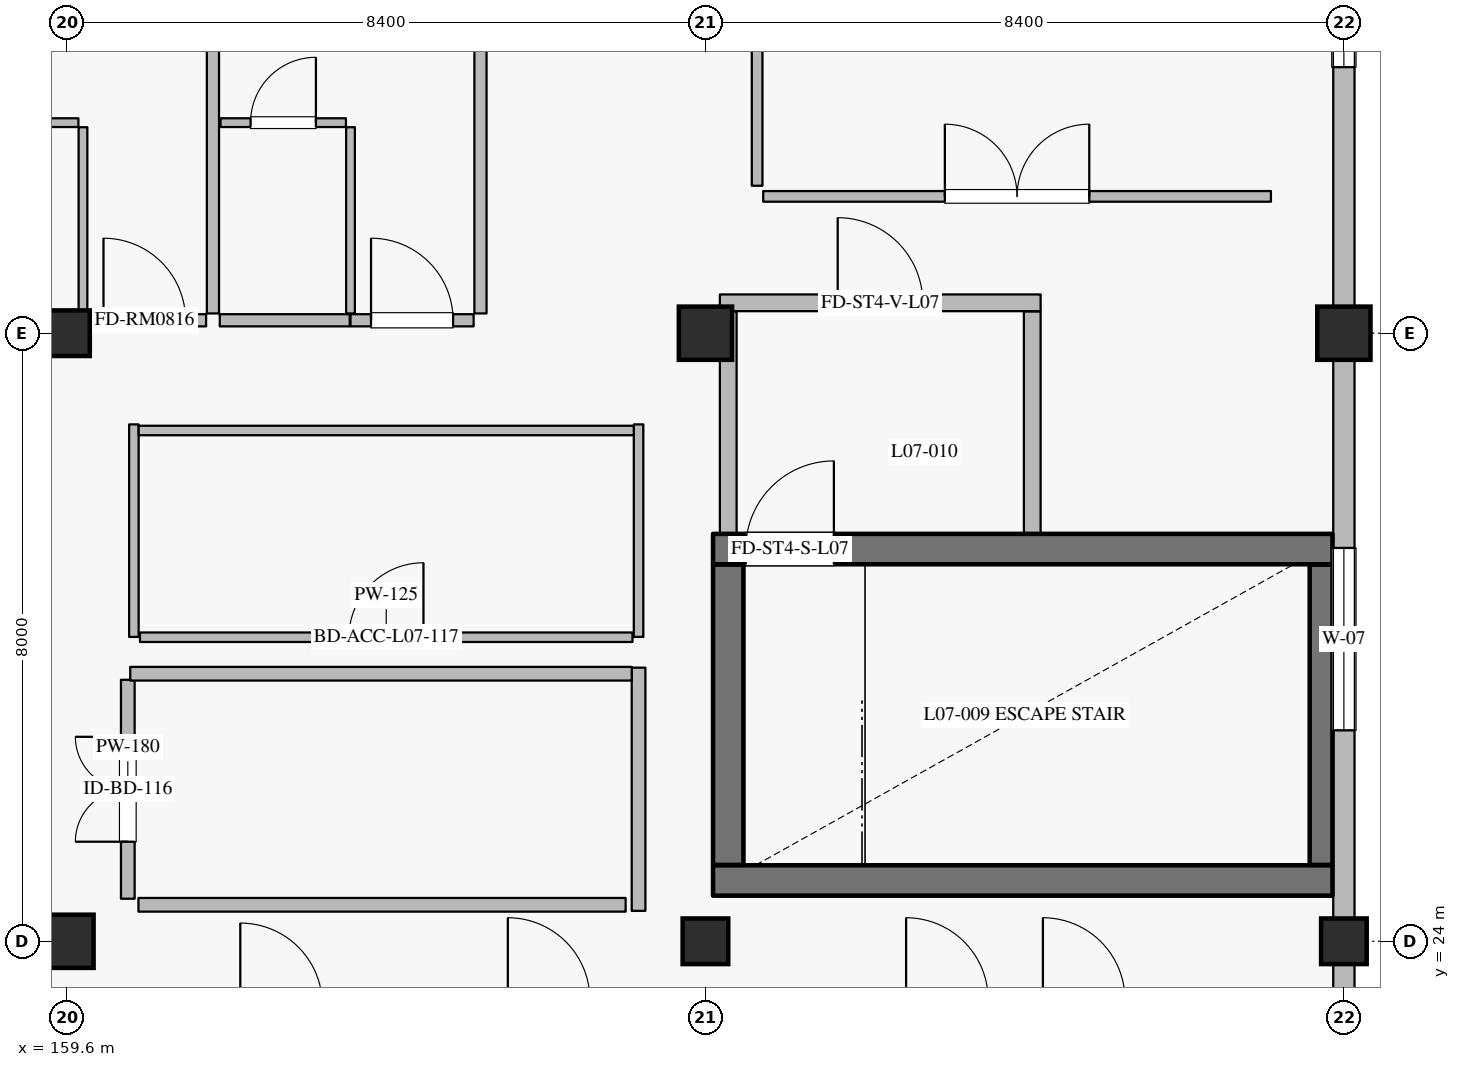
"""IFC4 building model, lengths in metres.
Left out: names, types, materials, properties, quantities, classifications, styles, units other than length and angle.
Written with IfcOpenShell. Run it as: python <this file> out.ifc"""

import sys

from ifc_helpers import new_model, si_unit, direction, frame, frame_2d, origin, origin_2d, place, context, subcontext, project, spatial, rectangle, extrude, element, fill, save


model = new_model("IFC4")
c1 = context("Model", 3, precision=1e-05, world=origin(), true_north=direction((0.0, 1.0)))
c2 = subcontext(c1, "Body", "Model", "MODEL_VIEW")
j1 = project(units=[si_unit("LENGTHUNIT", "METRE"), si_unit("PLANEANGLEUNIT", "RADIAN")], contexts=[c1])
p1 = place(None, origin())
s1 = spatial("IfcSite", under=j1, at=p1, CompositionType="ELEMENT")
p2 = place(p1, origin())
s2 = spatial("IfcBuilding", under=s1, at=p2, CompositionType="ELEMENT")
p3 = place(p2, frame((0.0, 0.0, 32.4)))
s3 = spatial("IfcBuildingStorey", under=s2, at=p3, CompositionType="ELEMENT", Elevation=32.4)
for number, where, z_axis, x_axis in (
    (1, (159.6, 24.0, 0.0), (0.0, 0.0, 1.0), (1.0, 0.0, 0.0)),
    (2, (168.0, 32.0, 0.0), (0.0, 0.0, 1.0), (1.0, 0.0, 0.0)),
    (3, (176.4, 32.0, 0.0), (0.0, 0.0, 1.0), (1.0, 0.0, 0.0)),
):
    element("IfcColumn", number, at=place(p3, frame(where, z_axis=z_axis, x_axis=x_axis)), inside=s3, PredefinedType="COLUMN", context=c2, shape_type="SweptSolid", body=[
        extrude(rectangle(XDim=0.7, YDim=0.7, at=origin_2d()), origin(), (0.0, 0.0, 1.0), 3.6),
    ])
for number, where, z_axis, x_axis in (
    (4, (159.6, 32.0, 0.0), (0.0, 0.0, 1.0), (1.0, 0.0, 0.0)),
    (5, (168.0, 24.0, 0.0), (0.0, 0.0, 1.0), (1.0, 0.0, 0.0)),
    (6, (176.4, 24.0, 0.0), (0.0, 0.0, 1.0), (1.0, 0.0, 0.0)),
):
    element("IfcColumn", number, at=place(p3, frame(where, z_axis=z_axis, x_axis=x_axis)), inside=s3, PredefinedType="COLUMN", context=c2, shape_type="SweptSolid", body=[
        extrude(rectangle(XDim=0.6, YDim=0.6, at=origin_2d()), origin(), (0.0, 0.0, 1.0), 3.6),
    ])
p4 = place(p3, frame((176.4, 39.7, 0.0), z_axis=(0.0, 0.0, 1.0), x_axis=(0.0, -1.0, 0.0)))
e7 = element("IfcWall", 7, at=p4, inside=s3, PredefinedType="SOLIDWALL", context=c2, shape_type="SweptSolid", body=[
    extrude(rectangle(XDim=7.35, YDim=0.28, at=frame_2d((3.675, 0.0))), origin(), (0.0, 0.0, 1.0), 2.7),
])
p5 = place(p4, frame((3.15, 0.0, 0.5)))
e8 = element("IfcOpeningElement", 8, at=p5, cuts=e7, PredefinedType="OPENING", context=c2, shape_type="SweptSolid", body=[
    extrude(rectangle(XDim=1.05, YDim=1.65, at=frame_2d((0.525, 0.825))), frame((0.0, 0.15, 0.0), z_axis=(0.0, -1.0, 0.0), x_axis=(1.0, 0.0, 0.0)), (0.0, 0.0, 1.0), 0.3),
])
p6 = place(p3, frame((176.4, 31.65, 0.0), z_axis=(0.0, 0.0, 1.0), x_axis=(0.0, -1.0, 0.0)))
e9 = element("IfcWall", 9, at=p6, inside=s3, PredefinedType="SOLIDWALL", context=c2, shape_type="SweptSolid", body=[
    extrude(rectangle(XDim=7.35, YDim=0.28, at=frame_2d((3.675, 0.0))), origin(), (0.0, 0.0, 1.0), 2.7),
])
p7 = place(p6, frame((2.475, 0.0, 0.5)))
e10 = element("IfcOpeningElement", 10, at=p7, cuts=e9, PredefinedType="OPENING", context=c2, shape_type="SweptSolid", body=[
    extrude(rectangle(XDim=2.4, YDim=1.65, at=frame_2d((1.2, 0.825))), frame((0.0, 0.15, 0.0), z_axis=(0.0, -1.0, 0.0), x_axis=(1.0, 0.0, 0.0)), (0.0, 0.0, 1.0), 0.3),
])
p8 = place(p3, frame((176.4, 23.7, 0.0), z_axis=(0.0, 0.0, 1.0), x_axis=(0.0, -1.0, 0.0)))
e11 = element("IfcWall", 11, at=p8, inside=s3, PredefinedType="SOLIDWALL", context=c2, shape_type="SweptSolid", body=[
    extrude(rectangle(XDim=7.35, YDim=0.28, at=frame_2d((3.675, 0.0))), origin(), (0.0, 0.0, 1.0), 2.7),
])
p9 = place(p8, frame((2.475, 0.0, 0.5)))
e12 = element("IfcOpeningElement", 12, at=p9, cuts=e11, PredefinedType="OPENING", context=c2, shape_type="SweptSolid", body=[
    extrude(rectangle(XDim=2.4, YDim=1.65, at=frame_2d((1.2, 0.825))), frame((0.0, 0.15, 0.0), z_axis=(0.0, -1.0, 0.0), x_axis=(1.0, 0.0, 0.0)), (0.0, 0.0, 1.0), 0.3),
])
p10 = place(p3, frame((168.1, 24.8, 0.0), z_axis=(0.0, 0.0, 1.0), x_axis=(1.0, 0.0, 0.0)))
e13 = element("IfcWall", 13, at=p10, inside=s3, PredefinedType="SHEAR", context=c2, shape_type="SweptSolid", body=[
    extrude(rectangle(XDim=8.15, YDim=0.4, at=frame_2d((4.075, 0.0))), origin(), (0.0, 0.0, 1.0), 3.335),
])
p11 = place(p3, frame((176.1, 25.005, 0.0), z_axis=(0.0, 0.0, 1.0), x_axis=(0.0, 1.0, 0.0)))
e14 = element("IfcWall", 14, at=p11, inside=s3, PredefinedType="SHEAR", context=c2, shape_type="SweptSolid", body=[
    extrude(rectangle(XDim=3.95, YDim=0.3, at=frame_2d((1.975, 0.0))), origin(), (0.0, 0.0, 1.0), 3.335),
])
p12 = place(p3, frame((168.1, 29.16, 0.0), z_axis=(0.0, 0.0, 1.0), x_axis=(1.0, 0.0, 0.0)))
e15 = element("IfcWall", 15, at=p12, inside=s3, PredefinedType="SHEAR", context=c2, shape_type="SweptSolid", body=[
    extrude(rectangle(XDim=8.15, YDim=0.4, at=frame_2d((4.075, 0.0))), origin(), (0.0, 0.0, 1.0), 3.335),
])
p13 = place(p12, frame((0.43, 0.0, 0.0)))
e16 = element("IfcOpeningElement", 16, at=p13, cuts=e15, PredefinedType="OPENING", context=c2, shape_type="SweptSolid", body=[
    extrude(rectangle(XDim=1.16, YDim=2.2, at=frame_2d((0.58, 1.1))), frame((0.0, 0.21, 0.0), z_axis=(0.0, -1.0, 0.0), x_axis=(1.0, 0.0, 0.0)), (0.0, 0.0, 1.0), 0.42),
])
p14 = place(p3, frame((168.3, 25.005, 0.0), z_axis=(0.0, 0.0, 1.0), x_axis=(0.0, 1.0, 0.0)))
e17 = element("IfcWall", 17, at=p14, inside=s3, PredefinedType="SHEAR", context=c2, shape_type="SweptSolid", body=[
    extrude(rectangle(XDim=3.95, YDim=0.4, at=frame_2d((1.975, 0.0))), origin(), (0.0, 0.0, 1.0), 3.335),
])
p15 = place(p3, frame((168.3, 29.365, 0.0), z_axis=(0.0, 0.0, 1.0), x_axis=(0.0, 1.0, 0.0)))
e18 = element("IfcWall", 18, at=p15, inside=s3, PredefinedType="PARTITIONING", context=c2, shape_type="SweptSolid", body=[
    extrude(rectangle(XDim=2.92, YDim=0.22, at=frame_2d((1.46, 0.0))), origin(), (0.0, 0.0, 1.0), 3.335),
])
p16 = place(p3, frame((168.19, 32.4, 0.0), z_axis=(0.0, 0.0, 1.0), x_axis=(1.0, 0.0, 0.0)))
e19 = element("IfcWall", 19, at=p16, inside=s3, PredefinedType="PARTITIONING", context=c2, shape_type="SweptSolid", body=[
    extrude(rectangle(XDim=4.22, YDim=0.22, at=frame_2d((2.11, 0.0))), origin(), (0.0, 0.0, 1.0), 3.335),
])
p17 = place(p16, frame((1.55, 0.0, 0.0)))
e20 = element("IfcOpeningElement", 20, at=p17, cuts=e19, PredefinedType="OPENING", context=c2, shape_type="SweptSolid", body=[
    extrude(rectangle(XDim=1.12, YDim=2.2, at=frame_2d((0.56, 1.1))), frame((0.0, 0.12, 0.0), z_axis=(0.0, -1.0, 0.0), x_axis=(1.0, 0.0, 0.0)), (0.0, 0.0, 1.0), 0.24),
])
p18 = place(p3, frame((172.3, 29.365, 0.0), z_axis=(0.0, 0.0, 1.0), x_axis=(0.0, 1.0, 0.0)))
e21 = element("IfcWall", 21, at=p18, inside=s3, PredefinedType="PARTITIONING", context=c2, shape_type="SweptSolid", body=[
    extrude(rectangle(XDim=2.92, YDim=0.22, at=frame_2d((1.46, 0.0))), origin(), (0.0, 0.0, 1.0), 3.335),
])
p19 = place(p3, frame((158.09, 32.17, 0.0), z_axis=(0.0, 0.0, 1.0), x_axis=(1.0, 0.0, 0.0)))
e22 = element("IfcWall", 22, at=p19, inside=s3, PredefinedType="PARTITIONING", context=c2, shape_type="SweptSolid", body=[
    extrude(rectangle(XDim=1.71, YDim=0.16, at=frame_2d((0.855, 0.0))), origin(), (0.0, 0.0, 1.0), 2.84),
])
p20 = place(p3, frame((159.81, 32.17, 0.0), z_axis=(0.0, 0.0, 1.0), x_axis=(1.0, 0.0, 0.0)))
e23 = element("IfcWall", 23, at=p20, inside=s3, PredefinedType="PARTITIONING", context=c2, shape_type="SweptSolid", body=[
    extrude(rectangle(XDim=1.62, YDim=0.16, at=frame_2d((0.81, 0.0))), origin(), (0.0, 0.0, 1.0), 3.335),
])
p21 = place(p20, frame((0.27, 0.0, 0.0)))
e24 = element("IfcOpeningElement", 24, at=p21, cuts=e23, PredefinedType="OPENING", context=c2, shape_type="SweptSolid", body=[
    extrude(rectangle(XDim=1.08, YDim=2.3, at=frame_2d((0.54, 1.15))), frame((0.0, 0.09, 0.0), z_axis=(0.0, -1.0, 0.0), x_axis=(1.0, 0.0, 0.0)), (0.0, 0.0, 1.0), 0.18),
])
p22 = place(p3, frame((159.81, 32.26, 0.0), z_axis=(0.0, 0.0, 1.0), x_axis=(0.0, 1.0, 0.0)))
e25 = element("IfcWall", 25, at=p22, inside=s3, PredefinedType="PARTITIONING", context=c2, shape_type="SweptSolid", body=[
    extrude(rectangle(XDim=2.45, YDim=0.115, at=frame_2d((1.225, 0.0))), origin(), (0.0, 0.0, 1.0), 2.74),
])
p23 = place(p3, frame((158.1, 34.77, 0.0), z_axis=(0.0, 0.0, 1.0), x_axis=(1.0, 0.0, 0.0)))
e26 = element("IfcWall", 26, at=p23, inside=s3, PredefinedType="PARTITIONING", context=c2, shape_type="SweptSolid", body=[
    extrude(rectangle(XDim=1.65, YDim=0.115, at=frame_2d((0.825, 0.0))), origin(), (0.0, 0.0, 1.0), 3.335),
])
p24 = place(p23, frame((0.395, 0.0, 0.0)))
e27 = element("IfcOpeningElement", 27, at=p24, cuts=e26, PredefinedType="OPENING", context=c2, shape_type="SweptSolid", body=[
    extrude(rectangle(XDim=0.86, YDim=2.12, at=frame_2d((0.43, 1.06))), frame((0.0, 0.067, 0.0), z_axis=(0.0, -1.0, 0.0), x_axis=(1.0, 0.0, 0.0)), (0.0, 0.0, 1.0), 0.135),
])
p25 = place(p3, frame((161.61, 32.17, 0.0), z_axis=(0.0, 0.0, 1.0), x_axis=(1.0, 0.0, 0.0)))
e28 = element("IfcWall", 28, at=p25, inside=s3, PredefinedType="PARTITIONING", context=c2, shape_type="SweptSolid", body=[
    extrude(rectangle(XDim=1.71, YDim=0.16, at=frame_2d((0.855, 0.0))), origin(), (0.0, 0.0, 1.0), 3.335),
])
p26 = place(p3, frame((163.33, 32.17, 0.0), z_axis=(0.0, 0.0, 1.0), x_axis=(1.0, 0.0, 0.0)))
e29 = element("IfcWall", 29, at=p26, inside=s3, PredefinedType="PARTITIONING", context=c2, shape_type="SweptSolid", body=[
    extrude(rectangle(XDim=1.62, YDim=0.16, at=frame_2d((0.81, 0.0))), origin(), (0.0, 0.0, 1.0), 3.335),
])
p27 = place(p26, frame((0.27, 0.0, 0.0)))
e30 = element("IfcOpeningElement", 30, at=p27, cuts=e29, PredefinedType="OPENING", context=c2, shape_type="SweptSolid", body=[
    extrude(rectangle(XDim=1.08, YDim=2.3, at=frame_2d((0.54, 1.15))), frame((0.0, 0.09, 0.0), z_axis=(0.0, -1.0, 0.0), x_axis=(1.0, 0.0, 0.0)), (0.0, 0.0, 1.0), 0.18),
])
p28 = place(p3, frame((163.33, 32.26, 0.0), z_axis=(0.0, 0.0, 1.0), x_axis=(0.0, 1.0, 0.0)))
e31 = element("IfcWall", 31, at=p28, inside=s3, PredefinedType="PARTITIONING", context=c2, shape_type="SweptSolid", body=[
    extrude(rectangle(XDim=2.45, YDim=0.115, at=frame_2d((1.225, 0.0))), origin(), (0.0, 0.0, 1.0), 3.335),
])
p29 = place(p3, frame((161.62, 34.77, 0.0), z_axis=(0.0, 0.0, 1.0), x_axis=(1.0, 0.0, 0.0)))
e32 = element("IfcWall", 32, at=p29, inside=s3, PredefinedType="PARTITIONING", context=c2, shape_type="SweptSolid", body=[
    extrude(rectangle(XDim=1.65, YDim=0.115, at=frame_2d((0.825, 0.0))), origin(), (0.0, 0.0, 1.0), 3.335),
])
p30 = place(p29, frame((0.395, 0.0, 0.0)))
e33 = element("IfcOpeningElement", 33, at=p30, cuts=e32, PredefinedType="OPENING", context=c2, shape_type="SweptSolid", body=[
    extrude(rectangle(XDim=0.86, YDim=2.12, at=frame_2d((0.43, 1.06))), frame((0.0, 0.067, 0.0), z_axis=(0.0, -1.0, 0.0), x_axis=(1.0, 0.0, 0.0)), (0.0, 0.0, 1.0), 0.135),
])
p31 = place(p3, frame((161.52, 32.26, 0.0), z_axis=(0.0, 0.0, 1.0), x_axis=(0.0, 1.0, 0.0)))
e34 = element("IfcWall", 34, at=p31, inside=s3, PredefinedType="PARTITIONING", context=c2, shape_type="SweptSolid", body=[
    extrude(rectangle(XDim=9.23, YDim=0.16, at=frame_2d((4.615, 0.0))), origin(), (0.0, 0.0, 1.0), 3.335),
])
p32 = place(p3, frame((165.04, 32.26, 0.0), z_axis=(0.0, 0.0, 1.0), x_axis=(0.0, 1.0, 0.0)))
e35 = element("IfcWall", 35, at=p32, inside=s3, PredefinedType="PARTITIONING", context=c2, shape_type="SweptSolid", body=[
    extrude(rectangle(XDim=8.64, YDim=0.16, at=frame_2d((4.32, 0.0))), origin(), (0.0, 0.0, 1.0), 3.335),
])
p33 = place(p3, frame((160.4, 24.56, 0.0), z_axis=(0.0, 0.0, 1.0), x_axis=(0.0, 1.0, 0.0)))
e36 = element("IfcWall", 36, at=p33, inside=s3, PredefinedType="PARTITIONING", context=c2, shape_type="SweptSolid", body=[
    extrude(rectangle(XDim=2.88, YDim=0.18, at=frame_2d((1.44, 0.0))), origin(), (0.0, 0.0, 1.0), 3.335),
])
p34 = place(p33, frame((0.75, 0.0, 0.0)))
e37 = element("IfcOpeningElement", 37, at=p34, cuts=e36, PredefinedType="OPENING", context=c2, shape_type="SweptSolid", body=[
    extrude(rectangle(XDim=1.38, YDim=2.3, at=frame_2d((0.69, 1.15))), frame((0.0, 0.1, 0.0), z_axis=(0.0, -1.0, 0.0), x_axis=(1.0, 0.0, 0.0)), (0.0, 0.0, 1.0), 0.2),
])
p35 = place(p3, frame((160.54, 24.48, 0.0), z_axis=(0.0, 0.0, 1.0), x_axis=(1.0, 0.0, 0.0)))
e38 = element("IfcWall", 38, at=p35, inside=s3, PredefinedType="PARTITIONING", context=c2, shape_type="SweptSolid", body=[
    extrude(rectangle(XDim=6.41, YDim=0.18, at=frame_2d((3.205, 0.0))), origin(), (0.0, 0.0, 1.0), 3.335),
])
p36 = place(p3, frame((160.56, 28.0, 0.0), z_axis=(0.0, 0.0, 1.0), x_axis=(1.0, 0.0, 0.0)))
e39 = element("IfcWall", 39, at=p36, inside=s3, PredefinedType="PARTITIONING", context=c2, shape_type="SweptSolid", body=[
    extrude(rectangle(XDim=6.48, YDim=0.125, at=frame_2d((3.24, 0.0))), origin(), (0.0, 0.0, 1.0), 3.335),
])
p37 = place(p36, frame((2.75, 0.0, 0.0)))
e40 = element("IfcOpeningElement", 40, at=p37, cuts=e39, PredefinedType="OPENING", context=c2, shape_type="SweptSolid", body=[
    extrude(rectangle(XDim=0.98, YDim=2.15, at=frame_2d((0.49, 1.075))), frame((0.0, 0.073, 0.0), z_axis=(0.0, -1.0, 0.0), x_axis=(1.0, 0.0, 0.0)), (0.0, 0.0, 1.0), 0.145),
])
p38 = place(p3, frame((168.76, 33.8, 0.0), z_axis=(0.0, 0.0, 1.0), x_axis=(1.0, 0.0, 0.0)))
e41 = element("IfcWall", 41, at=p38, inside=s3, PredefinedType="PARTITIONING", context=c2, shape_type="SweptSolid", body=[
    extrude(rectangle(XDim=6.68, YDim=0.14, at=frame_2d((3.34, 0.0))), origin(), (0.0, 0.0, 1.0), 3.335),
])
p39 = place(p38, frame((2.39, 0.0, 0.0)))
e42 = element("IfcOpeningElement", 42, at=p39, cuts=e41, PredefinedType="OPENING", context=c2, shape_type="SweptSolid", body=[
    extrude(rectangle(XDim=1.9, YDim=2.4, at=frame_2d((0.95, 1.2))), frame((0.0, 0.08, 0.0), z_axis=(0.0, -1.0, 0.0), x_axis=(1.0, 0.0, 0.0)), (0.0, 0.0, 1.0), 0.16),
])
p40 = place(p3, frame((168.68, 33.94, 0.0), z_axis=(0.0, 0.0, 1.0), x_axis=(0.0, 1.0, 0.0)))
e43 = element("IfcWall", 43, at=p40, inside=s3, PredefinedType="PARTITIONING", context=c2, shape_type="SweptSolid", body=[
    extrude(rectangle(XDim=4.61, YDim=0.14, at=frame_2d((2.305, 0.0))), origin(), (0.0, 0.0, 1.0), 3.335),
])
p41 = place(p3, frame((167.12, 24.4, 0.0), z_axis=(0.0, 0.0, 1.0), x_axis=(0.0, 1.0, 0.0)))
e44 = element("IfcWall", 44, at=p41, inside=s3, PredefinedType="PARTITIONING", context=c2, shape_type="SweptSolid", body=[
    extrude(rectangle(XDim=3.2, YDim=0.18, at=frame_2d((1.6, 0.0))), origin(), (0.0, 0.0, 1.0), 3.335),
])
p42 = place(p3, frame((160.432, 27.52, 0.0), z_axis=(0.0, 0.0, 1.0), x_axis=(1.0, 0.0, 0.0)))
e45 = element("IfcWall", 45, at=p42, inside=s3, PredefinedType="PARTITIONING", context=c2, shape_type="SweptSolid", body=[
    extrude(rectangle(XDim=6.598, YDim=0.18, at=frame_2d((3.299, 0.0))), origin(), (0.0, 0.0, 1.0), 3.335),
])
for number, where, z_axis, x_axis in (
    (46, (160.48, 28.004, 0.0), (0.0, 0.0, 1.0), (0.0, 1.0, 0.0)),
    (47, (167.12, 28.004, 0.0), (0.0, 0.0, 1.0), (0.0, 1.0, 0.0)),
):
    element("IfcWall", number, at=place(p3, frame(where, z_axis=z_axis, x_axis=x_axis)), inside=s3, PredefinedType="PARTITIONING", context=c2, shape_type="SweptSolid", body=[
        extrude(rectangle(XDim=2.796, YDim=0.125, at=frame_2d((1.398, 0.0))), origin(), (0.0, 0.0, 1.0), 3.335),
    ])
p43 = place(p3, frame((160.543, 30.72, 0.0), z_axis=(0.0, 0.0, 1.0), x_axis=(1.0, 0.0, 0.0)))
e48 = element("IfcWall", 48, at=p43, inside=s3, PredefinedType="PARTITIONING", context=c2, shape_type="SweptSolid", body=[
    extrude(rectangle(XDim=6.514, YDim=0.125, at=frame_2d((3.257, 0.0))), origin(), (0.0, 0.0, 1.0), 3.335),
])
p44 = place(p5, origin())
e49 = element("IfcWindow", 49, at=p44, inside=s3, PartitioningType="SINGLE_PANEL", PredefinedType="WINDOW", context=c2, shape_type="SweptSolid", body=[
    extrude(rectangle(XDim=1.05, YDim=1.65, at=frame_2d((0.525, 0.825))), frame((0.0, 0.03, 0.0), z_axis=(0.0, -1.0, 0.0), x_axis=(1.0, 0.0, 0.0)), (0.0, 0.0, 1.0), 0.06),
])
fill(e8, e49)
p45 = place(p7, origin())
e50 = element("IfcWindow", 50, at=p45, inside=s3, PartitioningType="DOUBLE_PANEL_VERTICAL", PredefinedType="WINDOW", context=c2, shape_type="SweptSolid", body=[
    extrude(rectangle(XDim=2.4, YDim=1.65, at=frame_2d((1.2, 0.825))), frame((0.0, 0.03, 0.0), z_axis=(0.0, -1.0, 0.0), x_axis=(1.0, 0.0, 0.0)), (0.0, 0.0, 1.0), 0.06),
])
fill(e10, e50)
p46 = place(p13, origin())
e51 = element("IfcDoor", 51, at=p46, inside=s3, OperationType="SINGLE_SWING_RIGHT", PredefinedType="DOOR", context=c2, shape_type="SweptSolid", body=[
    extrude(rectangle(XDim=1.16, YDim=2.2, at=frame_2d((0.58, 1.1))), frame((0.0, 0.025, 0.0), z_axis=(0.0, -1.0, 0.0), x_axis=(1.0, 0.0, 0.0)), (0.0, 0.0, 1.0), 0.05),
])
fill(e16, e51)
p47 = place(p17, origin())
e52 = element("IfcDoor", 52, at=p47, inside=s3, OperationType="SINGLE_SWING_LEFT", PredefinedType="DOOR", context=c2, shape_type="SweptSolid", body=[
    extrude(rectangle(XDim=1.12, YDim=2.2, at=frame_2d((0.56, 1.1))), frame((0.0, 0.025, 0.0), z_axis=(0.0, -1.0, 0.0), x_axis=(1.0, 0.0, 0.0)), (0.0, 0.0, 1.0), 0.05),
])
fill(e20, e52)
p48 = place(p21, origin())
e53 = element("IfcDoor", 53, at=p48, inside=s3, OperationType="SINGLE_SWING_LEFT", PredefinedType="DOOR", context=c2, shape_type="SweptSolid", body=[
    extrude(rectangle(XDim=1.08, YDim=2.3, at=frame_2d((0.54, 1.15))), frame((0.0, 0.025, 0.0), z_axis=(0.0, -1.0, 0.0), x_axis=(1.0, 0.0, 0.0)), (0.0, 0.0, 1.0), 0.05),
])
fill(e24, e53)
p49 = place(p27, origin())
e54 = element("IfcDoor", 54, at=p49, inside=s3, OperationType="SINGLE_SWING_LEFT", PredefinedType="DOOR", context=c2, shape_type="SweptSolid", body=[
    extrude(rectangle(XDim=1.08, YDim=2.3, at=frame_2d((0.54, 1.15))), frame((0.0, 0.025, 0.0), z_axis=(0.0, -1.0, 0.0), x_axis=(1.0, 0.0, 0.0)), (0.0, 0.0, 1.0), 0.05),
])
fill(e30, e54)
p50 = place(p30, origin())
e55 = element("IfcDoor", 55, at=p50, inside=s3, OperationType="SINGLE_SWING_RIGHT", PredefinedType="DOOR", context=c2, shape_type="SweptSolid", body=[
    extrude(rectangle(XDim=0.86, YDim=2.12, at=frame_2d((0.43, 1.06))), frame((0.0, 0.025, 0.0), z_axis=(0.0, -1.0, 0.0), x_axis=(1.0, 0.0, 0.0)), (0.0, 0.0, 1.0), 0.05),
])
fill(e33, e55)
p51 = place(p34, origin())
e56 = element("IfcDoor", 56, at=p51, inside=s3, OperationType="DOUBLE_DOOR_SINGLE_SWING", PredefinedType="DOOR", context=c2, shape_type="SweptSolid", body=[
    extrude(rectangle(XDim=1.38, YDim=2.3, at=frame_2d((0.69, 1.15))), frame((0.0, 0.025, 0.0), z_axis=(0.0, -1.0, 0.0), x_axis=(1.0, 0.0, 0.0)), (0.0, 0.0, 1.0), 0.05),
])
fill(e37, e56)
p52 = place(p37, origin())
e57 = element("IfcDoor", 57, at=p52, inside=s3, OperationType="SINGLE_SWING_RIGHT", PredefinedType="DOOR", context=c2, shape_type="SweptSolid", body=[
    extrude(rectangle(XDim=0.98, YDim=2.15, at=frame_2d((0.49, 1.075))), frame((0.0, 0.025, 0.0), z_axis=(0.0, -1.0, 0.0), x_axis=(1.0, 0.0, 0.0)), (0.0, 0.0, 1.0), 0.05),
])
fill(e40, e57)
p53 = place(p39, origin())
e58 = element("IfcDoor", 58, at=p53, inside=s3, OperationType="DOUBLE_DOOR_SINGLE_SWING", PredefinedType="DOOR", context=c2, shape_type="SweptSolid", body=[
    extrude(rectangle(XDim=1.9, YDim=2.4, at=frame_2d((0.95, 1.2))), frame((0.0, 0.025, 0.0), z_axis=(0.0, -1.0, 0.0), x_axis=(1.0, 0.0, 0.0)), (0.0, 0.0, 1.0), 0.05),
])
fill(e42, e58)
save(model, sys.argv[1])
